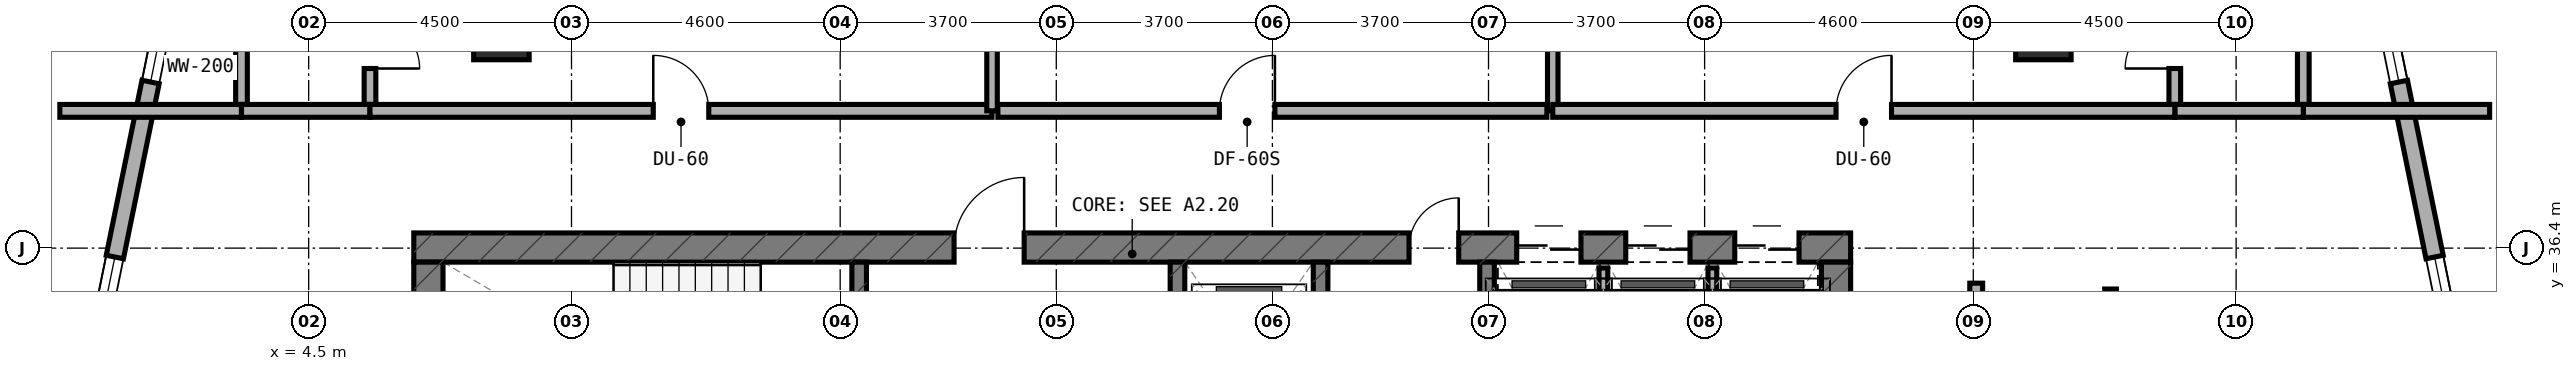
"""IFC4 building model, lengths in metres.
Left out: names, types, materials, properties, quantities, classifications, styles, units other than length and angle.
Written with IfcOpenShell. Run it as: python <this file> out.ifc"""

import sys

from ifc_helpers import new_model, si_unit, direction, frame, frame_2d, origin, origin_2d, place, context, subcontext, project, spatial, rectangle, extrude, element, fill, save


model = new_model("IFC4")
c1 = context("Model", 3, precision=1e-05, world=origin(), true_north=direction((0.0, 1.0)))
c2 = subcontext(c1, "Body", "Model", "MODEL_VIEW")
j1 = project(units=[si_unit("LENGTHUNIT", "METRE"), si_unit("PLANEANGLEUNIT", "RADIAN")], contexts=[c1])
p1 = place(None, origin())
s1 = spatial("IfcSite", under=j1, at=p1, CompositionType="ELEMENT")
p2 = place(p1, origin())
s2 = spatial("IfcBuilding", under=s1, at=p2, CompositionType="ELEMENT")
p3 = place(p2, frame((0.0, 0.0, 83.5)))
s3 = spatial("IfcBuildingStorey", under=s2, at=p3, CompositionType="ELEMENT", Elevation=83.5)
p4 = place(p3, frame((6.3, 36.41, 0.0), z_axis=(0.0, 0.0, 1.0), x_axis=(1.0, 0.0, 0.0)))
e1 = element("IfcWall", 1, at=p4, inside=s3, PredefinedType="SHEAR", context=c2, shape_type="SweptSolid", body=[
    extrude(rectangle(XDim=24.6, YDim=0.5, at=frame_2d((12.3, 0.0))), origin(), (0.0, 0.0, 1.0), 3.5),
])
p5 = place(p4, frame((9.25, 0.0, 0.0)))
e2 = element("IfcOpeningElement", 2, at=p5, cuts=e1, PredefinedType="OPENING", context=c2, shape_type="SweptSolid", body=[
    extrude(rectangle(XDim=1.2, YDim=2.15, at=frame_2d((0.6, 1.075))), frame((0.0, 0.26, 0.0), z_axis=(0.0, -1.0, 0.0), x_axis=(1.0, 0.0, 0.0)), (0.0, 0.0, 1.0), 0.52),
])
p6 = place(p4, frame((17.04, 0.0, 0.0)))
e3 = element("IfcOpeningElement", 3, at=p6, cuts=e1, PredefinedType="OPENING", context=c2, shape_type="SweptSolid", body=[
    extrude(rectangle(XDim=0.85, YDim=2.1, at=frame_2d((0.425, 1.05))), frame((0.0, 0.26, 0.0), z_axis=(0.0, -1.0, 0.0), x_axis=(1.0, 0.0, 0.0)), (0.0, 0.0, 1.0), 0.52),
])
p7 = place(p4, frame((18.883, 0.0, 0.0)))
e4 = element("IfcOpeningElement", 4, at=p7, cuts=e1, PredefinedType="OPENING", context=c2, shape_type="SweptSolid", body=[
    extrude(rectangle(XDim=1.1, YDim=2.15, at=frame_2d((0.55, 1.075))), frame((0.0, 0.26, 0.0), z_axis=(0.0, -1.0, 0.0), x_axis=(1.0, 0.0, 0.0)), (0.0, 0.0, 1.0), 0.52),
])
p8 = place(p4, frame((20.75, 0.0, 0.0)))
e5 = element("IfcOpeningElement", 5, at=p8, cuts=e1, PredefinedType="OPENING", context=c2, shape_type="SweptSolid", body=[
    extrude(rectangle(XDim=1.1, YDim=2.15, at=frame_2d((0.55, 1.075))), frame((0.0, 0.26, 0.0), z_axis=(0.0, -1.0, 0.0), x_axis=(1.0, 0.0, 0.0)), (0.0, 0.0, 1.0), 0.52),
])
p9 = place(p4, frame((22.616, 0.0, 0.0)))
e6 = element("IfcOpeningElement", 6, at=p9, cuts=e1, PredefinedType="OPENING", context=c2, shape_type="SweptSolid", body=[
    extrude(rectangle(XDim=1.1, YDim=2.15, at=frame_2d((0.55, 1.075))), frame((0.0, 0.26, 0.0), z_axis=(0.0, -1.0, 0.0), x_axis=(1.0, 0.0, 0.0)), (0.0, 0.0, 1.0), 0.52),
])
for number, where, z_axis, x_axis in (
    (7, (6.55, 33.0, 0.0), (0.0, 0.0, 1.0), (0.0, 1.0, 0.0)),
    (8, (30.65, 33.0, 0.0), (0.0, 0.0, 1.0), (0.0, 1.0, 0.0)),
):
    element("IfcWall", number, at=place(p3, frame(where, z_axis=z_axis, x_axis=x_axis)), inside=s3, PredefinedType="SHEAR", context=c2, shape_type="SweptSolid", body=[
        extrude(rectangle(XDim=3.16, YDim=0.5, at=frame_2d((1.58, 0.0))), origin(), (0.0, 0.0, 1.0), 3.5),
    ])
p10 = place(p3, frame((13.925, 33.0, 0.0), z_axis=(0.0, 0.0, 1.0), x_axis=(0.0, 1.0, 0.0)))
e9 = element("IfcWall", 9, at=p10, inside=s3, PredefinedType="STANDARD", context=c2, shape_type="SweptSolid", body=[
    extrude(rectangle(XDim=3.16, YDim=0.25, at=frame_2d((1.58, 0.0))), origin(), (0.0, 0.0, 1.0), 3.22),
])
p11 = place(p10, frame((0.98, 0.0, 0.0)))
e10 = element("IfcOpeningElement", 10, at=p11, cuts=e9, PredefinedType="OPENING", context=c2, shape_type="SweptSolid", body=[
    extrude(rectangle(XDim=1.1, YDim=2.15, at=frame_2d((0.55, 1.075))), frame((0.0, 0.135, 0.0), z_axis=(0.0, -1.0, 0.0), x_axis=(1.0, 0.0, 0.0)), (0.0, 0.0, 1.0), 0.27),
])
p12 = place(p3, frame((19.375, 33.0, 0.0), z_axis=(0.0, 0.0, 1.0), x_axis=(0.0, 1.0, 0.0)))
e11 = element("IfcWall", 11, at=p12, inside=s3, PredefinedType="STANDARD", context=c2, shape_type="SweptSolid", body=[
    extrude(rectangle(XDim=3.16, YDim=0.25, at=frame_2d((1.58, 0.0))), origin(), (0.0, 0.0, 1.0), 3.22),
])
p13 = place(p12, frame((0.98, 0.0, 0.0)))
e12 = element("IfcOpeningElement", 12, at=p13, cuts=e11, PredefinedType="OPENING", context=c2, shape_type="SweptSolid", body=[
    extrude(rectangle(XDim=1.1, YDim=2.15, at=frame_2d((0.55, 1.075))), frame((0.0, 0.135, 0.0), z_axis=(0.0, -1.0, 0.0), x_axis=(1.0, 0.0, 0.0)), (0.0, 0.0, 1.0), 0.27),
])
for number, where, z_axis, x_axis in (
    (13, (21.825, 33.0, 0.0), (0.0, 0.0, 1.0), (0.0, 1.0, 0.0)),
    (14, (24.675, 33.0, 0.0), (0.0, 0.0, 1.0), (0.0, 1.0, 0.0)),
):
    element("IfcWall", number, at=place(p3, frame(where, z_axis=z_axis, x_axis=x_axis)), inside=s3, PredefinedType="STANDARD", context=c2, shape_type="SweptSolid", body=[
        extrude(rectangle(XDim=3.16, YDim=0.25, at=frame_2d((1.58, 0.0))), origin(), (0.0, 0.0, 1.0), 3.22),
    ])
for number, where, z_axis, x_axis in (
    (15, (34.2, 40.2, 0.0), (0.0, 0.0, 1.0), (1.0, 0.0, 0.0)),
    (16, (7.8, 40.2, 0.0), (0.0, 0.0, 1.0), (1.0, 0.0, 0.0)),
):
    element("IfcColumn", number, at=place(p3, frame(where, z_axis=z_axis, x_axis=x_axis)), inside=s3, PredefinedType="COLUMN", context=c2, shape_type="SweptSolid", body=[
        extrude(rectangle(XDim=0.95, YDim=1.15, at=origin_2d()), origin(), (0.0, 0.0, 1.0), 3.5),
    ])
p14 = place(p3, frame((41.864, 31.516, 0.0), z_axis=(0.0, 0.0, 1.0), x_axis=(-0.199990901713, 0.979797754249, 0.0)))
e17 = element("IfcWall", 17, at=p14, inside=s3, PredefinedType="STANDARD", context=c2, shape_type="SweptSolid", body=[
    extrude(rectangle(XDim=10.065, YDim=0.3, at=frame_2d((5.033, 0.0))), origin(), (0.0, 0.0, 1.0), 3.22),
])
p15 = place(p14, frame((2.429, 0.0, 0.8)))
e18 = element("IfcOpeningElement", 18, at=p15, cuts=e17, PredefinedType="OPENING", context=c2, shape_type="SweptSolid", body=[
    extrude(rectangle(XDim=2.4, YDim=1.6, at=frame_2d((1.2, 0.8))), frame((0.0, 0.16, 0.0), z_axis=(0.0, -1.0, 0.0), x_axis=(1.0, 0.0, 0.0)), (0.0, 0.0, 1.0), 0.32),
])
p16 = place(p14, frame((7.887, 0.0, 0.85)))
e19 = element("IfcOpeningElement", 19, at=p16, cuts=e17, PredefinedType="OPENING", context=c2, shape_type="SweptSolid", body=[
    extrude(rectangle(XDim=1.8, YDim=1.5, at=frame_2d((0.9, 0.75))), frame((0.0, 0.16, 0.0), z_axis=(0.0, -1.0, 0.0), x_axis=(1.0, 0.0, 0.0)), (0.0, 0.0, 1.0), 0.32),
])
p17 = place(p3, frame((2.229, 41.378, 0.0), z_axis=(0.0, 0.0, 1.0), x_axis=(-0.199990901713, -0.979797754249, 0.0)))
e20 = element("IfcWall", 20, at=p17, inside=s3, PredefinedType="STANDARD", context=c2, shape_type="SweptSolid", body=[
    extrude(rectangle(XDim=10.065, YDim=0.3, at=frame_2d((5.033, 0.0))), origin(), (0.0, 0.0, 1.0), 3.22),
])
p18 = place(p17, frame((0.378, 0.0, 0.85)))
e21 = element("IfcOpeningElement", 21, at=p18, cuts=e20, PredefinedType="OPENING", context=c2, shape_type="SweptSolid", body=[
    extrude(rectangle(XDim=1.8, YDim=1.5, at=frame_2d((0.9, 0.75))), frame((0.0, 0.16, 0.0), z_axis=(0.0, -1.0, 0.0), x_axis=(1.0, 0.0, 0.0)), (0.0, 0.0, 1.0), 0.32),
])
p19 = place(p17, frame((5.236, 0.0, 0.8)))
e22 = element("IfcOpeningElement", 22, at=p19, cuts=e20, PredefinedType="OPENING", context=c2, shape_type="SweptSolid", body=[
    extrude(rectangle(XDim=2.4, YDim=1.6, at=frame_2d((1.2, 0.8))), frame((0.0, 0.16, 0.0), z_axis=(0.0, -1.0, 0.0), x_axis=(1.0, 0.0, 0.0)), (0.0, 0.0, 1.0), 0.32),
])
p20 = place(p3, frame((26.667, 33.1, 0.0), z_axis=(0.0, 0.0, 1.0), x_axis=(0.0, 1.0, 0.0)))
e23 = element("IfcWall", 23, at=p20, inside=s3, PredefinedType="PARTITIONING", context=c2, shape_type="SweptSolid", body=[
    extrude(rectangle(XDim=2.96, YDim=0.15, at=frame_2d((1.48, 0.0))), origin(), (0.0, 0.0, 1.0), 3.22),
])
p21 = place(p3, frame((28.533, 33.1, 0.0), z_axis=(0.0, 0.0, 1.0), x_axis=(0.0, 1.0, 0.0)))
e24 = element("IfcWall", 24, at=p21, inside=s3, PredefinedType="PARTITIONING", context=c2, shape_type="SweptSolid", body=[
    extrude(rectangle(XDim=2.96, YDim=0.15, at=frame_2d((1.48, 0.0))), origin(), (0.0, 0.0, 1.0), 2.595),
])
p22 = place(p3, frame((5.55, 38.85, 0.0), z_axis=(0.0, 0.0, 1.0), x_axis=(0.0, 1.0, 0.0)))
e25 = element("IfcWall", 25, at=p22, inside=s3, PredefinedType="PLUMBINGWALL", context=c2, shape_type="SweptSolid", body=[
    extrude(rectangle(XDim=2.1, YDim=0.2, at=frame_2d((1.05, 0.0))), origin(), (0.0, 0.0, 1.0), 3.22),
])
p23 = place(p22, frame((0.625, 0.0, 0.0)))
e26 = element("IfcOpeningElement", 26, at=p23, cuts=e25, PredefinedType="OPENING", context=c2, shape_type="SweptSolid", body=[
    extrude(rectangle(XDim=0.85, YDim=2.1, at=frame_2d((0.425, 1.05))), frame((0.0, 0.11, 0.0), z_axis=(0.0, -1.0, 0.0), x_axis=(1.0, 0.0, 0.0)), (0.0, 0.0, 1.0), 0.22),
])
p24 = place(p3, frame((3.35, 38.85, 0.0), z_axis=(0.0, 0.0, 1.0), x_axis=(0.0, 1.0, 0.0)))
e27 = element("IfcWall", 27, at=p24, inside=s3, PredefinedType="PLUMBINGWALL", context=c2, shape_type="SweptSolid", body=[
    extrude(rectangle(XDim=2.1, YDim=0.2, at=frame_2d((1.05, 0.0))), origin(), (0.0, 0.0, 1.0), 3.22),
])
p25 = place(p3, frame((0.24, 38.75, 0.0), z_axis=(0.0, 0.0, 1.0), x_axis=(1.0, 0.0, 0.0)))
e28 = element("IfcWall", 28, at=p25, inside=s3, PredefinedType="SOLIDWALL", context=c2, shape_type="SweptSolid", body=[
    extrude(rectangle(XDim=3.11, YDim=0.22, at=frame_2d((1.555, 0.0))), origin(), (0.0, 0.0, 1.0), 3.22),
])
p26 = place(p3, frame((3.35, 38.75, 0.0), z_axis=(0.0, 0.0, 1.0), x_axis=(1.0, 0.0, 0.0)))
e29 = element("IfcWall", 29, at=p26, inside=s3, PredefinedType="SOLIDWALL", context=c2, shape_type="SweptSolid", body=[
    extrude(rectangle(XDim=2.2, YDim=0.22, at=frame_2d((1.1, 0.0))), origin(), (0.0, 0.0, 1.0), 3.22),
])
p27 = place(p3, frame((5.55, 38.75, 0.0), z_axis=(0.0, 0.0, 1.0), x_axis=(1.0, 0.0, 0.0)))
e30 = element("IfcWall", 30, at=p27, inside=s3, PredefinedType="SOLIDWALL", context=c2, shape_type="SweptSolid", body=[
    extrude(rectangle(XDim=10.65, YDim=0.22, at=frame_2d((5.325, 0.0))), origin(), (0.0, 0.0, 1.0), 2.595),
])
p28 = place(p27, frame((4.85, 0.0, 0.0)))
e31 = element("IfcOpeningElement", 31, at=p28, cuts=e30, PredefinedType="OPENING", context=c2, shape_type="SweptSolid", body=[
    extrude(rectangle(XDim=0.95, YDim=2.1, at=frame_2d((0.475, 1.05))), frame((0.0, 0.12, 0.0), z_axis=(0.0, -1.0, 0.0), x_axis=(1.0, 0.0, 0.0)), (0.0, 0.0, 1.0), 0.24),
])
p29 = place(p3, frame((16.2, 38.75, 0.0), z_axis=(0.0, 0.0, 1.0), x_axis=(0.0, 1.0, 0.0)))
e32 = element("IfcWall", 32, at=p29, inside=s3, PredefinedType="SOLIDWALL", context=c2, shape_type="SweptSolid", body=[
    extrude(rectangle(XDim=8.19, YDim=0.18, at=frame_2d((4.095, 0.0))), origin(), (0.0, 0.0, 1.0), 2.595),
])
p30 = place(p3, frame((16.3, 38.75, 0.0), z_axis=(0.0, 0.0, 1.0), x_axis=(1.0, 0.0, 0.0)))
e33 = element("IfcWall", 33, at=p30, inside=s3, PredefinedType="SOLIDWALL", context=c2, shape_type="SweptSolid", body=[
    extrude(rectangle(XDim=9.4, YDim=0.22, at=frame_2d((4.7, 0.0))), origin(), (0.0, 0.0, 1.0), 2.835),
])
p31 = place(p30, frame((3.793, 0.0, 0.0)))
e34 = element("IfcOpeningElement", 34, at=p31, cuts=e33, PredefinedType="OPENING", context=c2, shape_type="SweptSolid", body=[
    extrude(rectangle(XDim=0.95, YDim=2.1, at=frame_2d((0.475, 1.05))), frame((0.0, 0.12, 0.0), z_axis=(0.0, -1.0, 0.0), x_axis=(1.0, 0.0, 0.0)), (0.0, 0.0, 1.0), 0.24),
])
p32 = place(p3, frame((25.8, 38.75, 0.0), z_axis=(0.0, 0.0, 1.0), x_axis=(0.0, 1.0, 0.0)))
e35 = element("IfcWall", 35, at=p32, inside=s3, PredefinedType="SOLIDWALL", context=c2, shape_type="SweptSolid", body=[
    extrude(rectangle(XDim=8.19, YDim=0.18, at=frame_2d((4.095, 0.0))), origin(), (0.0, 0.0, 1.0), 2.595),
])
p33 = place(p3, frame((36.45, 38.85, 0.0), z_axis=(0.0, 0.0, 1.0), x_axis=(0.0, 1.0, 0.0)))
e36 = element("IfcWall", 36, at=p33, inside=s3, PredefinedType="PLUMBINGWALL", context=c2, shape_type="SweptSolid", body=[
    extrude(rectangle(XDim=2.1, YDim=0.2, at=frame_2d((1.05, 0.0))), origin(), (0.0, 0.0, 1.0), 3.22),
])
p34 = place(p33, frame((0.625, 0.0, 0.0)))
e37 = element("IfcOpeningElement", 37, at=p34, cuts=e36, PredefinedType="OPENING", context=c2, shape_type="SweptSolid", body=[
    extrude(rectangle(XDim=0.85, YDim=2.1, at=frame_2d((0.425, 1.05))), frame((0.0, 0.11, 0.0), z_axis=(0.0, -1.0, 0.0), x_axis=(1.0, 0.0, 0.0)), (0.0, 0.0, 1.0), 0.22),
])
p35 = place(p3, frame((38.65, 38.85, 0.0), z_axis=(0.0, 0.0, 1.0), x_axis=(0.0, 1.0, 0.0)))
e38 = element("IfcWall", 38, at=p35, inside=s3, PredefinedType="PLUMBINGWALL", context=c2, shape_type="SweptSolid", body=[
    extrude(rectangle(XDim=2.1, YDim=0.2, at=frame_2d((1.05, 0.0))), origin(), (0.0, 0.0, 1.0), 3.22),
])
p36 = place(p3, frame((38.65, 38.75, 0.0), z_axis=(0.0, 0.0, 1.0), x_axis=(1.0, 0.0, 0.0)))
e39 = element("IfcWall", 39, at=p36, inside=s3, PredefinedType="SOLIDWALL", context=c2, shape_type="SweptSolid", body=[
    extrude(rectangle(XDim=3.19, YDim=0.22, at=frame_2d((1.595, 0.0))), origin(), (0.0, 0.0, 1.0), 3.22),
])
p37 = place(p3, frame((36.45, 38.75, 0.0), z_axis=(0.0, 0.0, 1.0), x_axis=(1.0, 0.0, 0.0)))
e40 = element("IfcWall", 40, at=p37, inside=s3, PredefinedType="SOLIDWALL", context=c2, shape_type="SweptSolid", body=[
    extrude(rectangle(XDim=2.2, YDim=0.22, at=frame_2d((1.1, 0.0))), origin(), (0.0, 0.0, 1.0), 3.22),
])
p38 = place(p3, frame((25.8, 38.75, 0.0), z_axis=(0.0, 0.0, 1.0), x_axis=(1.0, 0.0, 0.0)))
e41 = element("IfcWall", 41, at=p38, inside=s3, PredefinedType="SOLIDWALL", context=c2, shape_type="SweptSolid", body=[
    extrude(rectangle(XDim=10.65, YDim=0.22, at=frame_2d((5.325, 0.0))), origin(), (0.0, 0.0, 1.0), 2.595),
])
p39 = place(p38, frame((4.85, 0.0, 0.0)))
e42 = element("IfcOpeningElement", 42, at=p39, cuts=e41, PredefinedType="OPENING", context=c2, shape_type="SweptSolid", body=[
    extrude(rectangle(XDim=0.95, YDim=2.1, at=frame_2d((0.475, 1.05))), frame((0.0, 0.12, 0.0), z_axis=(0.0, -1.0, 0.0), x_axis=(1.0, 0.0, 0.0)), (0.0, 0.0, 1.0), 0.24),
])
p40 = place(p3, frame((35.35, 33.7, 0.0), z_axis=(0.0, 0.0, 1.0), x_axis=(0.0, 1.0, 0.0)))
e43 = element("IfcWall", 43, at=p40, inside=s3, PredefinedType="PLUMBINGWALL", context=c2, shape_type="SweptSolid", body=[
    extrude(rectangle(XDim=2.0, YDim=0.2, at=frame_2d((1.0, 0.0))), origin(), (0.0, 0.0, 1.0), 2.745),
])
p41 = place(p3, frame((33.05, 33.6, 0.0), z_axis=(0.0, 0.0, 1.0), x_axis=(0.0, 1.0, 0.0)))
e44 = element("IfcWall", 44, at=p41, inside=s3, PredefinedType="SOLIDWALL", context=c2, shape_type="SweptSolid", body=[
    extrude(rectangle(XDim=2.2, YDim=0.22, at=frame_2d((1.1, 0.0))), origin(), (0.0, 0.0, 1.0), 3.22),
])
p42 = place(p15, origin())
e45 = element("IfcWindow", 45, at=p42, inside=s3, PartitioningType="SINGLE_PANEL", PredefinedType="WINDOW", context=c2, shape_type="SweptSolid", body=[
    extrude(rectangle(XDim=2.4, YDim=1.6, at=frame_2d((1.2, 0.8))), frame((0.0, 0.03, 0.0), z_axis=(0.0, -1.0, 0.0), x_axis=(1.0, 0.0, 0.0)), (0.0, 0.0, 1.0), 0.06),
])
fill(e18, e45)
p43 = place(p16, origin())
e46 = element("IfcWindow", 46, at=p43, inside=s3, PartitioningType="SINGLE_PANEL", PredefinedType="WINDOW", context=c2, shape_type="SweptSolid", body=[
    extrude(rectangle(XDim=1.8, YDim=1.5, at=frame_2d((0.9, 0.75))), frame((0.0, 0.03, 0.0), z_axis=(0.0, -1.0, 0.0), x_axis=(1.0, 0.0, 0.0)), (0.0, 0.0, 1.0), 0.06),
])
fill(e19, e46)
p44 = place(p18, origin())
e47 = element("IfcWindow", 47, at=p44, inside=s3, PartitioningType="SINGLE_PANEL", PredefinedType="WINDOW", context=c2, shape_type="SweptSolid", body=[
    extrude(rectangle(XDim=1.8, YDim=1.5, at=frame_2d((0.9, 0.75))), frame((0.0, 0.03, 0.0), z_axis=(0.0, -1.0, 0.0), x_axis=(1.0, 0.0, 0.0)), (0.0, 0.0, 1.0), 0.06),
])
fill(e21, e47)
p45 = place(p19, origin())
e48 = element("IfcWindow", 48, at=p45, inside=s3, PartitioningType="SINGLE_PANEL", PredefinedType="WINDOW", context=c2, shape_type="SweptSolid", body=[
    extrude(rectangle(XDim=2.4, YDim=1.6, at=frame_2d((1.2, 0.8))), frame((0.0, 0.03, 0.0), z_axis=(0.0, -1.0, 0.0), x_axis=(1.0, 0.0, 0.0)), (0.0, 0.0, 1.0), 0.06),
])
fill(e22, e48)
p46 = place(p5, origin())
e49 = element("IfcDoor", 49, at=p46, inside=s3, OperationType="SINGLE_SWING_RIGHT", PredefinedType="DOOR", context=c2, shape_type="SweptSolid", body=[
    extrude(rectangle(XDim=1.2, YDim=2.15, at=frame_2d((0.6, 1.075))), frame((0.0, 0.025, 0.0), z_axis=(0.0, -1.0, 0.0), x_axis=(1.0, 0.0, 0.0)), (0.0, 0.0, 1.0), 0.05),
])
fill(e2, e49)
p47 = place(p6, origin())
e50 = element("IfcDoor", 50, at=p47, inside=s3, OperationType="SINGLE_SWING_RIGHT", PredefinedType="DOOR", context=c2, shape_type="SweptSolid", body=[
    extrude(rectangle(XDim=0.85, YDim=2.1, at=frame_2d((0.425, 1.05))), frame((0.0, 0.025, 0.0), z_axis=(0.0, -1.0, 0.0), x_axis=(1.0, 0.0, 0.0)), (0.0, 0.0, 1.0), 0.05),
])
fill(e3, e50)
p48 = place(p7, origin())
e51 = element("IfcDoor", 51, at=p48, inside=s3, OperationType="DOUBLE_DOOR_SLIDING", PredefinedType="DOOR", context=c2, shape_type="SweptSolid", body=[
    extrude(rectangle(XDim=1.1, YDim=2.15, at=frame_2d((0.55, 1.075))), frame((0.0, 0.025, 0.0), z_axis=(0.0, -1.0, 0.0), x_axis=(1.0, 0.0, 0.0)), (0.0, 0.0, 1.0), 0.05),
])
fill(e4, e51)
p49 = place(p8, origin())
e52 = element("IfcDoor", 52, at=p49, inside=s3, OperationType="DOUBLE_DOOR_SLIDING", PredefinedType="DOOR", context=c2, shape_type="SweptSolid", body=[
    extrude(rectangle(XDim=1.1, YDim=2.15, at=frame_2d((0.55, 1.075))), frame((0.0, 0.025, 0.0), z_axis=(0.0, -1.0, 0.0), x_axis=(1.0, 0.0, 0.0)), (0.0, 0.0, 1.0), 0.05),
])
fill(e5, e52)
p50 = place(p9, origin())
e53 = element("IfcDoor", 53, at=p50, inside=s3, OperationType="DOUBLE_DOOR_SLIDING", PredefinedType="DOOR", context=c2, shape_type="SweptSolid", body=[
    extrude(rectangle(XDim=1.1, YDim=2.15, at=frame_2d((0.55, 1.075))), frame((0.0, 0.025, 0.0), z_axis=(0.0, -1.0, 0.0), x_axis=(1.0, 0.0, 0.0)), (0.0, 0.0, 1.0), 0.05),
])
fill(e6, e53)
p51 = place(p23, frame((0.85, 0.0, 0.0), z_axis=(0.0, 0.0, 1.0), x_axis=(-1.0, 0.0, 0.0)))
e54 = element("IfcDoor", 54, at=p51, inside=s3, OperationType="SINGLE_SWING_RIGHT", PredefinedType="DOOR", context=c2, shape_type="SweptSolid", body=[
    extrude(rectangle(XDim=0.85, YDim=2.1, at=frame_2d((0.425, 1.05))), frame((0.0, 0.025, 0.0), z_axis=(0.0, -1.0, 0.0), x_axis=(1.0, 0.0, 0.0)), (0.0, 0.0, 1.0), 0.05),
])
fill(e26, e54)
p52 = place(p28, origin())
e55 = element("IfcDoor", 55, at=p52, inside=s3, OperationType="SINGLE_SWING_LEFT", PredefinedType="DOOR", context=c2, shape_type="SweptSolid", body=[
    extrude(rectangle(XDim=0.95, YDim=2.1, at=frame_2d((0.475, 1.05))), frame((0.0, 0.025, 0.0), z_axis=(0.0, -1.0, 0.0), x_axis=(1.0, 0.0, 0.0)), (0.0, 0.0, 1.0), 0.05),
])
fill(e31, e55)
p53 = place(p31, origin())
e56 = element("IfcDoor", 56, at=p53, inside=s3, OperationType="SINGLE_SWING_RIGHT", PredefinedType="DOOR", context=c2, shape_type="SweptSolid", body=[
    extrude(rectangle(XDim=0.95, YDim=2.1, at=frame_2d((0.475, 1.05))), frame((0.0, 0.025, 0.0), z_axis=(0.0, -1.0, 0.0), x_axis=(1.0, 0.0, 0.0)), (0.0, 0.0, 1.0), 0.05),
])
fill(e34, e56)
p54 = place(p34, origin())
e57 = element("IfcDoor", 57, at=p54, inside=s3, OperationType="SINGLE_SWING_LEFT", PredefinedType="DOOR", context=c2, shape_type="SweptSolid", body=[
    extrude(rectangle(XDim=0.85, YDim=2.1, at=frame_2d((0.425, 1.05))), frame((0.0, 0.025, 0.0), z_axis=(0.0, -1.0, 0.0), x_axis=(1.0, 0.0, 0.0)), (0.0, 0.0, 1.0), 0.05),
])
fill(e37, e57)
p55 = place(p39, origin())
e58 = element("IfcDoor", 58, at=p55, inside=s3, OperationType="SINGLE_SWING_RIGHT", PredefinedType="DOOR", context=c2, shape_type="SweptSolid", body=[
    extrude(rectangle(XDim=0.95, YDim=2.1, at=frame_2d((0.475, 1.05))), frame((0.0, 0.025, 0.0), z_axis=(0.0, -1.0, 0.0), x_axis=(1.0, 0.0, 0.0)), (0.0, 0.0, 1.0), 0.05),
])
fill(e42, e58)
save(model, sys.argv[1])
